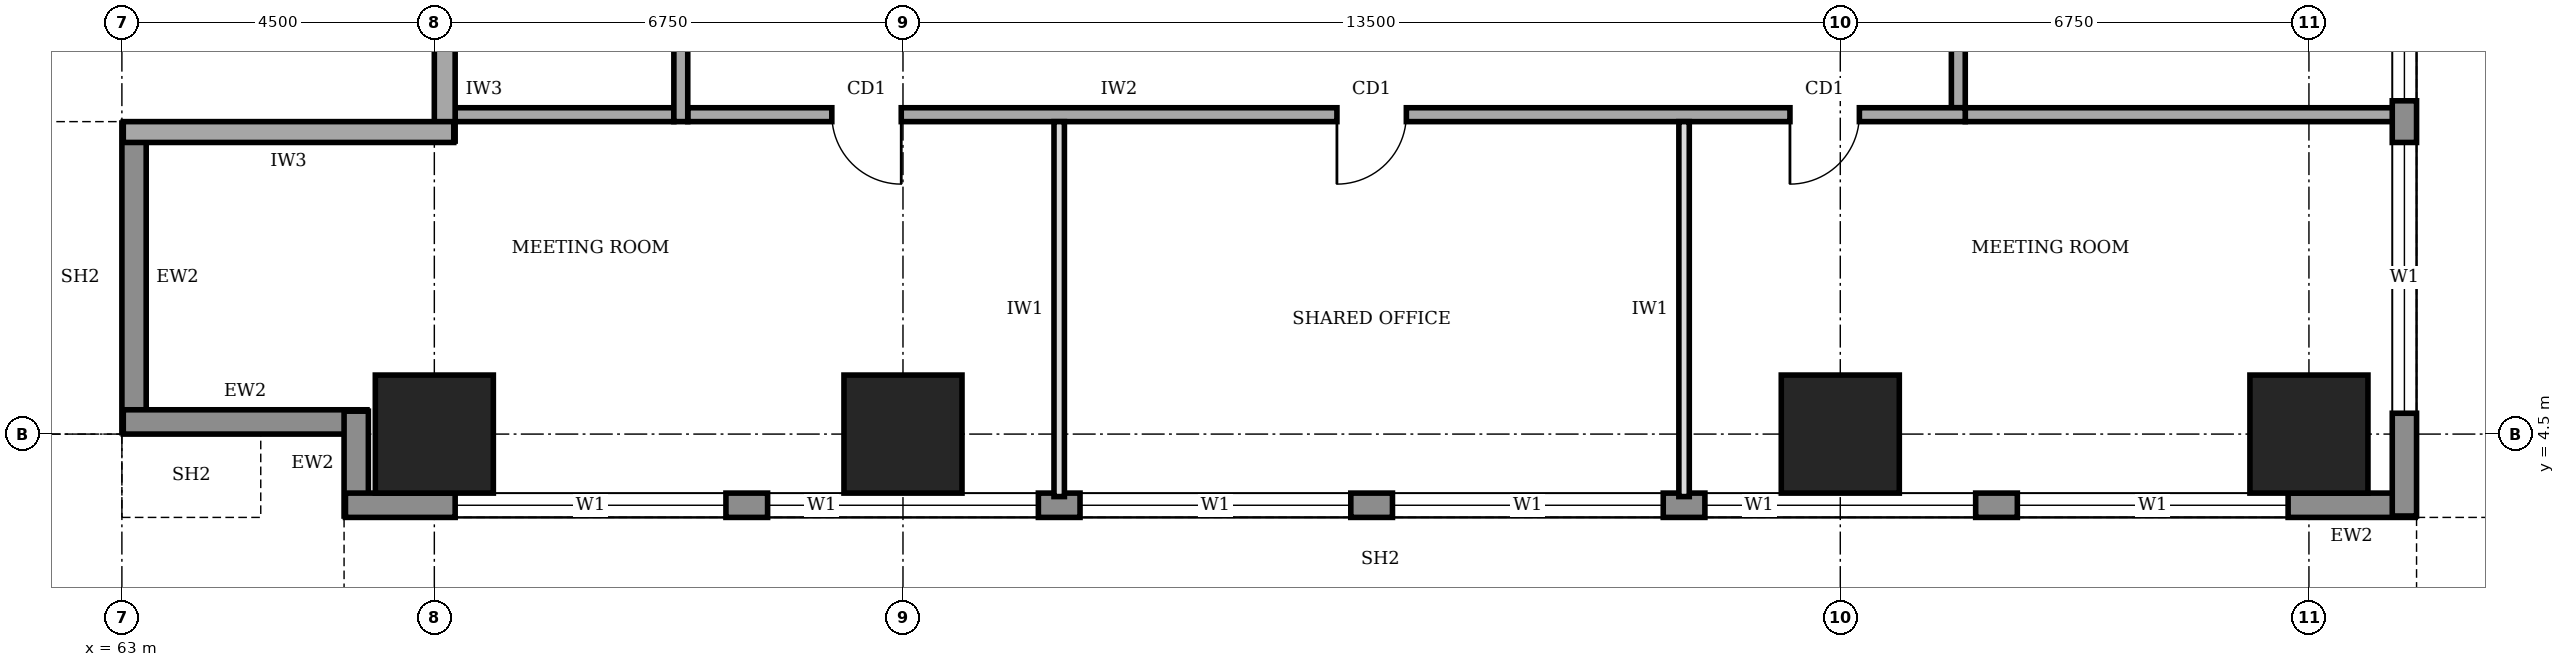
"""IFC4 building model, lengths in metres.
Left out: names, types, materials, properties, quantities, classifications, styles, units other than length and angle.
Written with IfcOpenShell. Run it as: python <this file> out.ifc"""

import sys

from ifc_helpers import new_model, si_unit, direction, frame, frame_2d, origin, origin_2d, place, context, subcontext, project, spatial, rectangle, extrude, element, fill, save


model = new_model("IFC4")
c1 = context("Model", 3, precision=1e-05, world=origin(), true_north=direction((0.0, 1.0)))
c2 = subcontext(c1, "Body", "Model", "MODEL_VIEW")
j1 = project(units=[si_unit("LENGTHUNIT", "METRE"), si_unit("PLANEANGLEUNIT", "RADIAN")], contexts=[c1])
p1 = place(None, origin())
s1 = spatial("IfcSite", under=j1, at=p1, CompositionType="ELEMENT")
p2 = place(p1, origin())
s2 = spatial("IfcBuilding", under=s1, at=p2, CompositionType="ELEMENT")
p3 = place(p2, frame((0.0, 0.0, 117.0)))
s3 = spatial("IfcBuildingStorey", under=s2, at=p3, CompositionType="ELEMENT", Elevation=117.0)
for number, where, z_axis, x_axis in (
    (1, (67.5, 4.5, 0.0), (0.0, 0.0, 1.0), (1.0, 0.0, 0.0)),
    (2, (74.25, 4.5, 0.0), (0.0, 0.0, 1.0), (1.0, 0.0, 0.0)),
    (3, (87.75, 4.5, 0.0), (0.0, 0.0, 1.0), (1.0, 0.0, 0.0)),
    (4, (94.5, 4.5, 0.0), (0.0, 0.0, 1.0), (1.0, 0.0, 0.0)),
):
    element("IfcColumn", number, at=place(p3, frame(where, z_axis=z_axis, x_axis=x_axis)), inside=s3, PredefinedType="COLUMN", context=c2, shape_type="SweptSolid", body=[
        extrude(rectangle(XDim=1.7, YDim=1.7, at=origin_2d()), origin(), (0.0, 0.0, 1.0), 4.0),
    ])
p4 = place(p3, frame((63.175, 8.98, 0.0), z_axis=(0.0, 0.0, 1.0), x_axis=(0.0, -1.0, 0.0)))
e5 = element("IfcWall", 5, at=p4, inside=s3, PredefinedType="STANDARD", context=c2, shape_type="SweptSolid", body=[
    extrude(rectangle(XDim=4.46, YDim=0.35, at=frame_2d((2.23, 0.0))), origin(), (0.0, 0.0, 1.0), 3.75),
])
p5 = place(p3, frame((63.02, 4.675, 0.0), z_axis=(0.0, 0.0, 1.0), x_axis=(1.0, 0.0, 0.0)))
e6 = element("IfcWall", 6, at=p5, inside=s3, PredefinedType="STANDARD", context=c2, shape_type="SweptSolid", body=[
    extrude(rectangle(XDim=3.51, YDim=0.35, at=frame_2d((1.755, 0.0))), origin(), (0.0, 0.0, 1.0), 2.85),
])
p6 = place(p3, frame((66.375, 4.83, 0.0), z_axis=(0.0, 0.0, 1.0), x_axis=(0.0, -1.0, 0.0)))
e7 = element("IfcWall", 7, at=p6, inside=s3, PredefinedType="STANDARD", context=c2, shape_type="SweptSolid", body=[
    extrude(rectangle(XDim=1.51, YDim=0.35, at=frame_2d((0.755, 0.0))), origin(), (0.0, 0.0, 1.0), 3.75),
])
p7 = place(p3, frame((66.22, 3.475, 0.0), z_axis=(0.0, 0.0, 1.0), x_axis=(1.0, 0.0, 0.0)))
e8 = element("IfcWall", 8, at=p7, inside=s3, PredefinedType="STANDARD", context=c2, shape_type="SweptSolid", body=[
    extrude(rectangle(XDim=29.81, YDim=0.35, at=frame_2d((14.905, 0.0))), origin(), (0.0, 0.0, 1.0), 3.75),
])
p8 = place(p7, frame((1.58, 0.0, 0.9)))
e9 = element("IfcOpeningElement", 9, at=p8, cuts=e8, PredefinedType="OPENING", context=c2, shape_type="SweptSolid", body=[
    extrude(rectangle(XDim=3.9, YDim=2.2, at=frame_2d((1.95, 1.1))), frame((0.0, 0.185, 0.0), z_axis=(0.0, -1.0, 0.0), x_axis=(1.0, 0.0, 0.0)), (0.0, 0.0, 1.0), 0.37),
])
p9 = place(p7, frame((6.08, 0.0, 0.9)))
e10 = element("IfcOpeningElement", 10, at=p9, cuts=e8, PredefinedType="OPENING", context=c2, shape_type="SweptSolid", body=[
    extrude(rectangle(XDim=3.9, YDim=2.2, at=frame_2d((1.95, 1.1))), frame((0.0, 0.185, 0.0), z_axis=(0.0, -1.0, 0.0), x_axis=(1.0, 0.0, 0.0)), (0.0, 0.0, 1.0), 0.37),
])
p10 = place(p7, frame((10.58, 0.0, 0.9)))
e11 = element("IfcOpeningElement", 11, at=p10, cuts=e8, PredefinedType="OPENING", context=c2, shape_type="SweptSolid", body=[
    extrude(rectangle(XDim=3.9, YDim=2.2, at=frame_2d((1.95, 1.1))), frame((0.0, 0.185, 0.0), z_axis=(0.0, -1.0, 0.0), x_axis=(1.0, 0.0, 0.0)), (0.0, 0.0, 1.0), 0.37),
])
p11 = place(p7, frame((15.08, 0.0, 0.9)))
e12 = element("IfcOpeningElement", 12, at=p11, cuts=e8, PredefinedType="OPENING", context=c2, shape_type="SweptSolid", body=[
    extrude(rectangle(XDim=3.9, YDim=2.2, at=frame_2d((1.95, 1.1))), frame((0.0, 0.185, 0.0), z_axis=(0.0, -1.0, 0.0), x_axis=(1.0, 0.0, 0.0)), (0.0, 0.0, 1.0), 0.37),
])
p12 = place(p7, frame((19.58, 0.0, 0.9)))
e13 = element("IfcOpeningElement", 13, at=p12, cuts=e8, PredefinedType="OPENING", context=c2, shape_type="SweptSolid", body=[
    extrude(rectangle(XDim=3.9, YDim=2.2, at=frame_2d((1.95, 1.1))), frame((0.0, 0.185, 0.0), z_axis=(0.0, -1.0, 0.0), x_axis=(1.0, 0.0, 0.0)), (0.0, 0.0, 1.0), 0.37),
])
p13 = place(p7, frame((24.08, 0.0, 0.9)))
e14 = element("IfcOpeningElement", 14, at=p13, cuts=e8, PredefinedType="OPENING", context=c2, shape_type="SweptSolid", body=[
    extrude(rectangle(XDim=3.9, YDim=2.2, at=frame_2d((1.95, 1.1))), frame((0.0, 0.185, 0.0), z_axis=(0.0, -1.0, 0.0), x_axis=(1.0, 0.0, 0.0)), (0.0, 0.0, 1.0), 0.37),
])
p14 = place(p3, frame((95.875, 3.32, 0.0), z_axis=(0.0, 0.0, 1.0), x_axis=(0.0, 1.0, 0.0)))
e15 = element("IfcWall", 15, at=p14, inside=s3, PredefinedType="STANDARD", context=c2, shape_type="SweptSolid", body=[
    extrude(rectangle(XDim=33.96, YDim=0.35, at=frame_2d((16.98, 0.0))), origin(), (0.0, 0.0, 1.0), 3.75),
])
p15 = place(p14, frame((1.48, 0.0, 0.9)))
e16 = element("IfcOpeningElement", 16, at=p15, cuts=e15, PredefinedType="OPENING", context=c2, shape_type="SweptSolid", body=[
    extrude(rectangle(XDim=3.9, YDim=2.2, at=frame_2d((1.95, 1.1))), frame((0.0, 0.185, 0.0), z_axis=(0.0, -1.0, 0.0), x_axis=(1.0, 0.0, 0.0)), (0.0, 0.0, 1.0), 0.37),
])
p16 = place(p14, frame((5.98, 0.0, 0.9)))
e17 = element("IfcOpeningElement", 17, at=p16, cuts=e15, PredefinedType="OPENING", context=c2, shape_type="SweptSolid", body=[
    extrude(rectangle(XDim=3.9, YDim=2.2, at=frame_2d((1.95, 1.1))), frame((0.0, 0.185, 0.0), z_axis=(0.0, -1.0, 0.0), x_axis=(1.0, 0.0, 0.0)), (0.0, 0.0, 1.0), 0.37),
])
p17 = place(p14, frame((10.48, 0.0, 0.9)))
e18 = element("IfcOpeningElement", 18, at=p17, cuts=e15, PredefinedType="OPENING", context=c2, shape_type="SweptSolid", body=[
    extrude(rectangle(XDim=3.9, YDim=2.2, at=frame_2d((1.95, 1.1))), frame((0.0, 0.185, 0.0), z_axis=(0.0, -1.0, 0.0), x_axis=(1.0, 0.0, 0.0)), (0.0, 0.0, 1.0), 0.37),
])
p18 = place(p14, frame((14.98, 0.0, 0.9)))
e19 = element("IfcOpeningElement", 19, at=p18, cuts=e15, PredefinedType="OPENING", context=c2, shape_type="SweptSolid", body=[
    extrude(rectangle(XDim=3.9, YDim=2.2, at=frame_2d((1.95, 1.1))), frame((0.0, 0.185, 0.0), z_axis=(0.0, -1.0, 0.0), x_axis=(1.0, 0.0, 0.0)), (0.0, 0.0, 1.0), 0.37),
])
p19 = place(p14, frame((19.48, 0.0, 0.9)))
e20 = element("IfcOpeningElement", 20, at=p19, cuts=e15, PredefinedType="OPENING", context=c2, shape_type="SweptSolid", body=[
    extrude(rectangle(XDim=3.9, YDim=2.2, at=frame_2d((1.95, 1.1))), frame((0.0, 0.185, 0.0), z_axis=(0.0, -1.0, 0.0), x_axis=(1.0, 0.0, 0.0)), (0.0, 0.0, 1.0), 0.37),
])
p20 = place(p14, frame((23.98, 0.0, 0.9)))
e21 = element("IfcOpeningElement", 21, at=p20, cuts=e15, PredefinedType="OPENING", context=c2, shape_type="SweptSolid", body=[
    extrude(rectangle(XDim=3.9, YDim=2.2, at=frame_2d((1.95, 1.1))), frame((0.0, 0.185, 0.0), z_axis=(0.0, -1.0, 0.0), x_axis=(1.0, 0.0, 0.0)), (0.0, 0.0, 1.0), 0.37),
])
p21 = place(p14, frame((28.48, 0.0, 0.9)))
e22 = element("IfcOpeningElement", 22, at=p21, cuts=e15, PredefinedType="OPENING", context=c2, shape_type="SweptSolid", body=[
    extrude(rectangle(XDim=3.9, YDim=2.2, at=frame_2d((1.95, 1.1))), frame((0.0, 0.185, 0.0), z_axis=(0.0, -1.0, 0.0), x_axis=(1.0, 0.0, 0.0)), (0.0, 0.0, 1.0), 0.37),
])
p22 = place(p3, frame((67.65, 10.2, 0.0), z_axis=(0.0, 0.0, 1.0), x_axis=(0.0, -1.0, 0.0)))
e23 = element("IfcWall", 23, at=p22, inside=s3, PredefinedType="SOLIDWALL", context=c2, shape_type="SweptSolid", body=[
    extrude(rectangle(XDim=1.48, YDim=0.3, at=frame_2d((0.74, 0.0))), origin(), (0.0, 0.0, 1.0), 2.65),
])
p23 = place(p3, frame((67.78, 8.85, 0.0), z_axis=(0.0, 0.0, 1.0), x_axis=(-1.0, 0.0, 0.0)))
e24 = element("IfcWall", 24, at=p23, inside=s3, PredefinedType="SOLIDWALL", context=c2, shape_type="SweptSolid", body=[
    extrude(rectangle(XDim=4.76, YDim=0.3, at=frame_2d((2.38, 0.0))), origin(), (0.0, 0.0, 1.0), 3.75),
])
p24 = place(p3, frame((71.15, 9.1, 0.0), z_axis=(0.0, 0.0, 1.0), x_axis=(1.0, 0.0, 0.0)))
e25 = element("IfcWall", 25, at=p24, inside=s3, PredefinedType="SOLIDWALL", context=c2, shape_type="SweptSolid", body=[
    extrude(rectangle(XDim=18.4, YDim=0.2, at=frame_2d((9.2, 0.0))), origin(), (0.0, 0.0, 1.0), 3.75),
])
p25 = place(p24, frame((2.075, 0.0, 0.0)))
e26 = element("IfcOpeningElement", 26, at=p25, cuts=e25, PredefinedType="OPENING", context=c2, shape_type="SweptSolid", body=[
    extrude(rectangle(XDim=1.0, YDim=2.1, at=frame_2d((0.5, 1.05))), frame((0.0, 0.11, 0.0), z_axis=(0.0, -1.0, 0.0), x_axis=(1.0, 0.0, 0.0)), (0.0, 0.0, 1.0), 0.22),
])
p26 = place(p24, frame((9.35, 0.0, 0.0)))
e27 = element("IfcOpeningElement", 27, at=p26, cuts=e25, PredefinedType="OPENING", context=c2, shape_type="SweptSolid", body=[
    extrude(rectangle(XDim=1.0, YDim=2.1, at=frame_2d((0.5, 1.05))), frame((0.0, 0.11, 0.0), z_axis=(0.0, -1.0, 0.0), x_axis=(1.0, 0.0, 0.0)), (0.0, 0.0, 1.0), 0.22),
])
p27 = place(p24, frame((15.875, 0.0, 0.0)))
e28 = element("IfcOpeningElement", 28, at=p27, cuts=e25, PredefinedType="OPENING", context=c2, shape_type="SweptSolid", body=[
    extrude(rectangle(XDim=1.0, YDim=2.1, at=frame_2d((0.5, 1.05))), frame((0.0, 0.11, 0.0), z_axis=(0.0, -1.0, 0.0), x_axis=(1.0, 0.0, 0.0)), (0.0, 0.0, 1.0), 0.22),
])
p28 = place(p3, frame((89.45, 9.2, 0.0), z_axis=(0.0, 0.0, 1.0), x_axis=(0.0, 1.0, 0.0)))
e29 = element("IfcWall", 29, at=p28, inside=s3, PredefinedType="SOLIDWALL", context=c2, shape_type="SweptSolid", body=[
    extrude(rectangle(XDim=22.3, YDim=0.2, at=frame_2d((11.15, 0.0))), origin(), (0.0, 0.0, 1.0), 3.75),
])
p29 = place(p28, frame((1.625, 0.0, 0.0)))
e30 = element("IfcOpeningElement", 30, at=p29, cuts=e29, PredefinedType="OPENING", context=c2, shape_type="SweptSolid", body=[
    extrude(rectangle(XDim=1.0, YDim=2.1, at=frame_2d((0.5, 1.05))), frame((0.0, 0.11, 0.0), z_axis=(0.0, -1.0, 0.0), x_axis=(1.0, 0.0, 0.0)), (0.0, 0.0, 1.0), 0.22),
])
p30 = place(p28, frame((5.05, 0.0, 0.0)))
e31 = element("IfcOpeningElement", 31, at=p30, cuts=e29, PredefinedType="OPENING", context=c2, shape_type="SweptSolid", body=[
    extrude(rectangle(XDim=1.0, YDim=2.1, at=frame_2d((0.5, 1.05))), frame((0.0, 0.11, 0.0), z_axis=(0.0, -1.0, 0.0), x_axis=(1.0, 0.0, 0.0)), (0.0, 0.0, 1.0), 0.22),
])
p31 = place(p28, frame((8.075, 0.0, 0.0)))
e32 = element("IfcOpeningElement", 32, at=p31, cuts=e29, PredefinedType="OPENING", context=c2, shape_type="SweptSolid", body=[
    extrude(rectangle(XDim=0.9, YDim=2.1, at=frame_2d((0.45, 1.05))), frame((0.0, 0.11, 0.0), z_axis=(0.0, -1.0, 0.0), x_axis=(1.0, 0.0, 0.0)), (0.0, 0.0, 1.0), 0.22),
])
p32 = place(p28, frame((11.05, 0.0, 0.0)))
e33 = element("IfcOpeningElement", 33, at=p32, cuts=e29, PredefinedType="OPENING", context=c2, shape_type="SweptSolid", body=[
    extrude(rectangle(XDim=0.9, YDim=2.1, at=frame_2d((0.45, 1.05))), frame((0.0, 0.11, 0.0), z_axis=(0.0, -1.0, 0.0), x_axis=(1.0, 0.0, 0.0)), (0.0, 0.0, 1.0), 0.22),
])
p33 = place(p28, frame((15.675, 0.0, 0.0)))
e34 = element("IfcOpeningElement", 34, at=p33, cuts=e29, PredefinedType="OPENING", context=c2, shape_type="SweptSolid", body=[
    extrude(rectangle(XDim=0.9, YDim=2.1, at=frame_2d((0.45, 1.05))), frame((0.0, 0.11, 0.0), z_axis=(0.0, -1.0, 0.0), x_axis=(1.0, 0.0, 0.0)), (0.0, 0.0, 1.0), 0.22),
])
p34 = place(p28, frame((13.1, 0.0, 0.0)))
e35 = element("IfcOpeningElement", 35, at=p34, cuts=e29, PredefinedType="OPENING", context=c2, shape_type="SweptSolid", body=[
    extrude(rectangle(XDim=1.0, YDim=2.1, at=frame_2d((0.5, 1.05))), frame((0.0, 0.11, 0.0), z_axis=(0.0, -1.0, 0.0), x_axis=(1.0, 0.0, 0.0)), (0.0, 0.0, 1.0), 0.22),
])
p35 = place(p28, frame((19.475, 0.0, 0.0)))
e36 = element("IfcOpeningElement", 36, at=p35, cuts=e29, PredefinedType="OPENING", context=c2, shape_type="SweptSolid", body=[
    extrude(rectangle(XDim=1.0, YDim=2.1, at=frame_2d((0.5, 1.05))), frame((0.0, 0.11, 0.0), z_axis=(0.0, -1.0, 0.0), x_axis=(1.0, 0.0, 0.0)), (0.0, 0.0, 1.0), 0.22),
])
p36 = place(p3, frame((71.05, 31.3, 0.0), z_axis=(0.0, 0.0, 1.0), x_axis=(0.0, -1.0, 0.0)))
e37 = element("IfcWall", 37, at=p36, inside=s3, PredefinedType="SOLIDWALL", context=c2, shape_type="SweptSolid", body=[
    extrude(rectangle(XDim=22.3, YDim=0.2, at=frame_2d((11.15, 0.0))), origin(), (0.0, 0.0, 1.0), 3.75),
])
p37 = place(p36, frame((10.15, 0.0, 0.0)))
e38 = element("IfcOpeningElement", 38, at=p37, cuts=e37, PredefinedType="OPENING", context=c2, shape_type="SweptSolid", body=[
    extrude(rectangle(XDim=1.8, YDim=2.1, at=frame_2d((0.9, 1.05))), frame((0.0, 0.11, 0.0), z_axis=(0.0, -1.0, 0.0), x_axis=(1.0, 0.0, 0.0)), (0.0, 0.0, 1.0), 0.22),
])
p38 = place(p3, frame((67.8, 9.1, 0.0), z_axis=(0.0, 0.0, 1.0), x_axis=(1.0, 0.0, 0.0)))
e39 = element("IfcWall", 39, at=p38, inside=s3, PredefinedType="SOLIDWALL", context=c2, shape_type="SweptSolid", body=[
    extrude(rectangle(XDim=3.15, YDim=0.2, at=frame_2d((1.575, 0.0))), origin(), (0.0, 0.0, 1.0), 3.75),
])
p39 = place(p3, frame((89.55, 9.1, 0.0), z_axis=(0.0, 0.0, 1.0), x_axis=(1.0, 0.0, 0.0)))
e40 = element("IfcWall", 40, at=p39, inside=s3, PredefinedType="SOLIDWALL", context=c2, shape_type="SweptSolid", body=[
    extrude(rectangle(XDim=6.2, YDim=0.2, at=frame_2d((3.1, 0.0))), origin(), (0.0, 0.0, 1.0), 3.75),
])
for number, where, z_axis, x_axis in (
    (41, (76.5, 3.6, 0.0), (0.0, 0.0, 1.0), (0.0, 1.0, 0.0)),
    (42, (85.5, 3.6, 0.0), (0.0, 0.0, 1.0), (0.0, 1.0, 0.0)),
):
    element("IfcWall", number, at=place(p3, frame(where, z_axis=z_axis, x_axis=x_axis)), inside=s3, PredefinedType="PARTITIONING", context=c2, shape_type="SweptSolid", body=[
        extrude(rectangle(XDim=5.4, YDim=0.15, at=frame_2d((2.7, 0.0))), origin(), (0.0, 0.0, 1.0), 3.75),
    ])
p40 = place(p8, origin())
e43 = element("IfcWindow", 43, at=p40, inside=s3, PartitioningType="SINGLE_PANEL", PredefinedType="WINDOW", context=c2, shape_type="SweptSolid", body=[
    extrude(rectangle(XDim=3.9, YDim=2.2, at=frame_2d((1.95, 1.1))), frame((0.0, 0.03, 0.0), z_axis=(0.0, -1.0, 0.0), x_axis=(1.0, 0.0, 0.0)), (0.0, 0.0, 1.0), 0.06),
])
fill(e9, e43)
p41 = place(p9, origin())
e44 = element("IfcWindow", 44, at=p41, inside=s3, PartitioningType="SINGLE_PANEL", PredefinedType="WINDOW", context=c2, shape_type="SweptSolid", body=[
    extrude(rectangle(XDim=3.9, YDim=2.2, at=frame_2d((1.95, 1.1))), frame((0.0, 0.03, 0.0), z_axis=(0.0, -1.0, 0.0), x_axis=(1.0, 0.0, 0.0)), (0.0, 0.0, 1.0), 0.06),
])
fill(e10, e44)
p42 = place(p10, origin())
e45 = element("IfcWindow", 45, at=p42, inside=s3, PartitioningType="SINGLE_PANEL", PredefinedType="WINDOW", context=c2, shape_type="SweptSolid", body=[
    extrude(rectangle(XDim=3.9, YDim=2.2, at=frame_2d((1.95, 1.1))), frame((0.0, 0.03, 0.0), z_axis=(0.0, -1.0, 0.0), x_axis=(1.0, 0.0, 0.0)), (0.0, 0.0, 1.0), 0.06),
])
fill(e11, e45)
p43 = place(p11, origin())
e46 = element("IfcWindow", 46, at=p43, inside=s3, PartitioningType="SINGLE_PANEL", PredefinedType="WINDOW", context=c2, shape_type="SweptSolid", body=[
    extrude(rectangle(XDim=3.9, YDim=2.2, at=frame_2d((1.95, 1.1))), frame((0.0, 0.03, 0.0), z_axis=(0.0, -1.0, 0.0), x_axis=(1.0, 0.0, 0.0)), (0.0, 0.0, 1.0), 0.06),
])
fill(e12, e46)
p44 = place(p12, origin())
e47 = element("IfcWindow", 47, at=p44, inside=s3, PartitioningType="SINGLE_PANEL", PredefinedType="WINDOW", context=c2, shape_type="SweptSolid", body=[
    extrude(rectangle(XDim=3.9, YDim=2.2, at=frame_2d((1.95, 1.1))), frame((0.0, 0.03, 0.0), z_axis=(0.0, -1.0, 0.0), x_axis=(1.0, 0.0, 0.0)), (0.0, 0.0, 1.0), 0.06),
])
fill(e13, e47)
p45 = place(p13, origin())
e48 = element("IfcWindow", 48, at=p45, inside=s3, PartitioningType="SINGLE_PANEL", PredefinedType="WINDOW", context=c2, shape_type="SweptSolid", body=[
    extrude(rectangle(XDim=3.9, YDim=2.2, at=frame_2d((1.95, 1.1))), frame((0.0, 0.03, 0.0), z_axis=(0.0, -1.0, 0.0), x_axis=(1.0, 0.0, 0.0)), (0.0, 0.0, 1.0), 0.06),
])
fill(e14, e48)
p46 = place(p15, origin())
e49 = element("IfcWindow", 49, at=p46, inside=s3, PartitioningType="SINGLE_PANEL", PredefinedType="WINDOW", context=c2, shape_type="SweptSolid", body=[
    extrude(rectangle(XDim=3.9, YDim=2.2, at=frame_2d((1.95, 1.1))), frame((0.0, 0.03, 0.0), z_axis=(0.0, -1.0, 0.0), x_axis=(1.0, 0.0, 0.0)), (0.0, 0.0, 1.0), 0.06),
])
fill(e16, e49)
p47 = place(p16, origin())
e50 = element("IfcWindow", 50, at=p47, inside=s3, PartitioningType="SINGLE_PANEL", PredefinedType="WINDOW", context=c2, shape_type="SweptSolid", body=[
    extrude(rectangle(XDim=3.9, YDim=2.2, at=frame_2d((1.95, 1.1))), frame((0.0, 0.03, 0.0), z_axis=(0.0, -1.0, 0.0), x_axis=(1.0, 0.0, 0.0)), (0.0, 0.0, 1.0), 0.06),
])
fill(e17, e50)
p48 = place(p25, frame((1.0, 0.0, 0.0), z_axis=(0.0, 0.0, 1.0), x_axis=(-1.0, 0.0, 0.0)))
e51 = element("IfcDoor", 51, at=p48, inside=s3, OperationType="SINGLE_SWING_LEFT", PredefinedType="DOOR", context=c2, shape_type="SweptSolid", body=[
    extrude(rectangle(XDim=1.0, YDim=2.1, at=frame_2d((0.5, 1.05))), frame((0.0, 0.025, 0.0), z_axis=(0.0, -1.0, 0.0), x_axis=(1.0, 0.0, 0.0)), (0.0, 0.0, 1.0), 0.05),
])
fill(e26, e51)
p49 = place(p26, frame((1.0, 0.0, 0.0), z_axis=(0.0, 0.0, 1.0), x_axis=(-1.0, 0.0, 0.0)))
e52 = element("IfcDoor", 52, at=p49, inside=s3, OperationType="SINGLE_SWING_RIGHT", PredefinedType="DOOR", context=c2, shape_type="SweptSolid", body=[
    extrude(rectangle(XDim=1.0, YDim=2.1, at=frame_2d((0.5, 1.05))), frame((0.0, 0.025, 0.0), z_axis=(0.0, -1.0, 0.0), x_axis=(1.0, 0.0, 0.0)), (0.0, 0.0, 1.0), 0.05),
])
fill(e27, e52)
p50 = place(p27, frame((1.0, 0.0, 0.0), z_axis=(0.0, 0.0, 1.0), x_axis=(-1.0, 0.0, 0.0)))
e53 = element("IfcDoor", 53, at=p50, inside=s3, OperationType="SINGLE_SWING_RIGHT", PredefinedType="DOOR", context=c2, shape_type="SweptSolid", body=[
    extrude(rectangle(XDim=1.0, YDim=2.1, at=frame_2d((0.5, 1.05))), frame((0.0, 0.025, 0.0), z_axis=(0.0, -1.0, 0.0), x_axis=(1.0, 0.0, 0.0)), (0.0, 0.0, 1.0), 0.05),
])
fill(e28, e53)
save(model, sys.argv[1])
